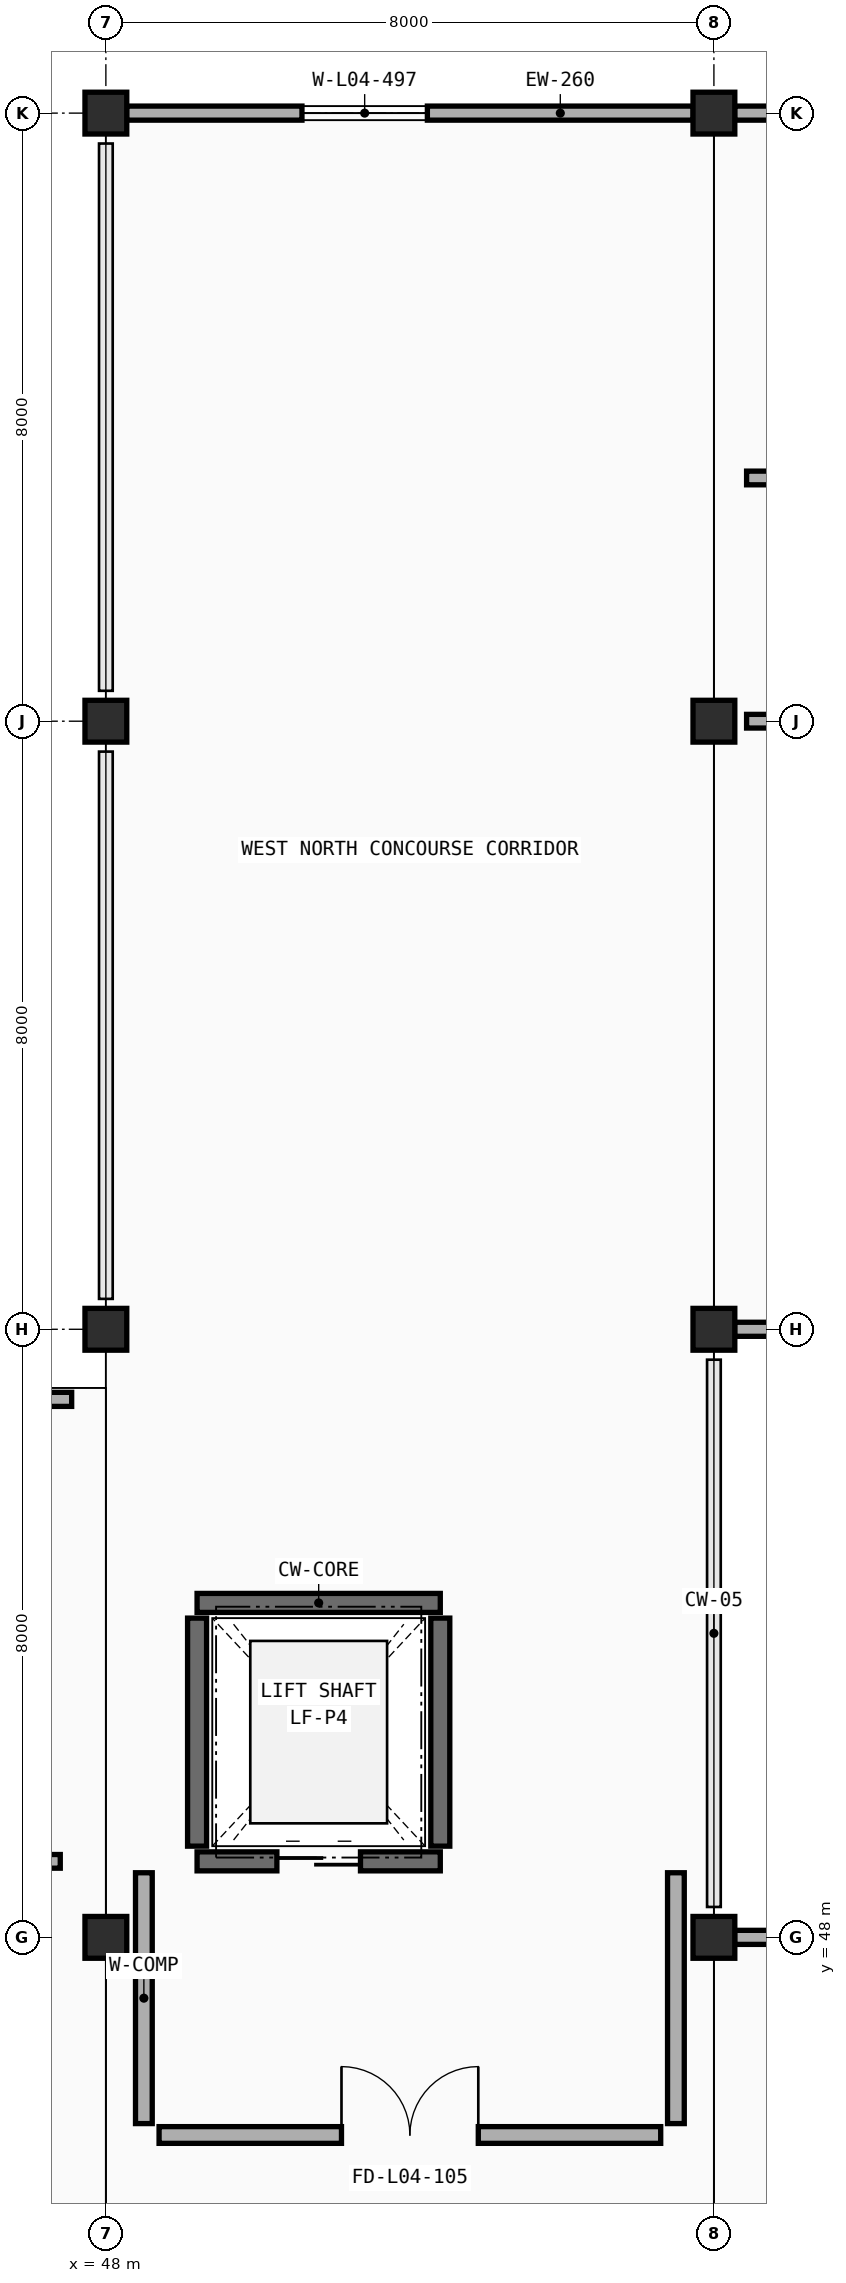
"""IFC4 building model, lengths in metres.
Left out: names, types, materials, properties, quantities, classifications, styles, units other than length and angle.
Written with IfcOpenShell. Run it as: python <this file> out.ifc"""

import sys

from ifc_helpers import new_model, si_unit, direction, frame, frame_2d, origin, origin_2d, place, context, subcontext, project, spatial, rectangle, extrude, element, fill, save


model = new_model("IFC4")
c1 = context("Model", 3, precision=1e-05, world=origin(), true_north=direction((0.0, 1.0)))
c2 = subcontext(c1, "Body", "Model", "MODEL_VIEW")
j1 = project(units=[si_unit("LENGTHUNIT", "METRE"), si_unit("PLANEANGLEUNIT", "RADIAN")], contexts=[c1])
p1 = place(None, origin())
s1 = spatial("IfcSite", under=j1, at=p1, CompositionType="ELEMENT")
p2 = place(p1, origin())
s2 = spatial("IfcBuilding", under=s1, at=p2, CompositionType="ELEMENT")
p3 = place(p2, frame((0.0, 0.0, 13.8)))
s3 = spatial("IfcBuildingStorey", under=s2, at=p3, CompositionType="ELEMENT", Elevation=13.8)
for number, where, z_axis, x_axis in (
    (1, (48.0, 48.0, 0.0), (0.0, 0.0, 1.0), (1.0, 0.0, 0.0)),
    (2, (56.0, 48.0, 0.0), (0.0, 0.0, 1.0), (1.0, 0.0, 0.0)),
    (3, (48.0, 56.0, 0.0), (0.0, 0.0, 1.0), (1.0, 0.0, 0.0)),
    (4, (56.0, 56.0, 0.0), (0.0, 0.0, 1.0), (1.0, 0.0, 0.0)),
    (5, (48.0, 64.0, 0.0), (0.0, 0.0, 1.0), (1.0, 0.0, 0.0)),
    (6, (56.0, 64.0, 0.0), (0.0, 0.0, 1.0), (1.0, 0.0, 0.0)),
    (7, (48.0, 72.0, 0.0), (0.0, 0.0, 1.0), (1.0, 0.0, 0.0)),
    (8, (56.0, 72.0, 0.0), (0.0, 0.0, 1.0), (1.0, 0.0, 0.0)),
):
    element("IfcColumn", number, at=place(p3, frame(where, z_axis=z_axis, x_axis=x_axis)), inside=s3, PredefinedType="COLUMN", context=c2, shape_type="SweptSolid", body=[
        extrude(rectangle(XDim=0.55, YDim=0.55, at=origin_2d()), origin(), (0.0, 0.0, 1.0), 4.2),
    ])
p4 = place(p3, frame((56.272, 48.0, 0.0), z_axis=(0.0, 0.0, 1.0), x_axis=(1.0, 0.0, 0.0)))
e9 = element("IfcWall", 9, at=p4, inside=s3, PredefinedType="STANDARD", context=c2, shape_type="SweptSolid", body=[
    extrude(rectangle(XDim=7.431, YDim=0.185, at=frame_2d((3.715, 0.0))), origin(), (0.0, 0.0, 1.0), 3.325),
])
p5 = place(p4, frame((2.308, 0.0, 0.9)))
e10 = element("IfcOpeningElement", 10, at=p5, cuts=e9, PredefinedType="OPENING", context=c2, shape_type="SweptSolid", body=[
    extrude(rectangle(XDim=2.25, YDim=1.55, at=frame_2d((1.125, 0.775))), frame((0.0, 0.103, 0.0), z_axis=(0.0, -1.0, 0.0), x_axis=(1.0, 0.0, 0.0)), (0.0, 0.0, 1.0), 0.205),
])
p6 = place(p3, frame((63.678, 56.0, 0.0), z_axis=(0.0, 0.0, 1.0), x_axis=(-1.0, 0.0, 0.0)))
e11 = element("IfcWall", 11, at=p6, inside=s3, PredefinedType="STANDARD", context=c2, shape_type="SweptSolid", body=[
    extrude(rectangle(XDim=7.406, YDim=0.185, at=frame_2d((3.703, 0.0))), origin(), (0.0, 0.0, 1.0), 3.325),
])
p7 = place(p6, frame((2.258, 0.0, 0.9)))
e12 = element("IfcOpeningElement", 12, at=p7, cuts=e11, PredefinedType="OPENING", context=c2, shape_type="SweptSolid", body=[
    extrude(rectangle(XDim=1.65, YDim=2.0, at=frame_2d((0.825, 1.0))), frame((0.0, 0.103, 0.0), z_axis=(0.0, -1.0, 0.0), x_axis=(1.0, 0.0, 0.0)), (0.0, 0.0, 1.0), 0.205),
])
p8 = place(p3, frame((56.272, 72.0, 0.0), z_axis=(0.0, 0.0, 1.0), x_axis=(1.0, 0.0, 0.0)))
e13 = element("IfcWall", 13, at=p8, inside=s3, PredefinedType="STANDARD", context=c2, shape_type="SweptSolid", body=[
    extrude(rectangle(XDim=7.406, YDim=0.185, at=frame_2d((3.703, 0.0))), origin(), (0.0, 0.0, 1.0), 3.325),
])
p9 = place(p8, frame((2.308, 0.0, 0.9)))
e14 = element("IfcOpeningElement", 14, at=p9, cuts=e13, PredefinedType="OPENING", context=c2, shape_type="SweptSolid", body=[
    extrude(rectangle(XDim=1.85, YDim=2.0, at=frame_2d((0.925, 1.0))), frame((0.0, 0.103, 0.0), z_axis=(0.0, -1.0, 0.0), x_axis=(1.0, 0.0, 0.0)), (0.0, 0.0, 1.0), 0.205),
])
p10 = place(p3, frame((48.272, 72.0, 0.0), z_axis=(0.0, 0.0, 1.0), x_axis=(1.0, 0.0, 0.0)))
e15 = element("IfcWall", 15, at=p10, inside=s3, PredefinedType="STANDARD", context=c2, shape_type="SweptSolid", body=[
    extrude(rectangle(XDim=7.456, YDim=0.185, at=frame_2d((3.728, 0.0))), origin(), (0.0, 0.0, 1.0), 3.325),
])
p11 = place(p10, frame((2.308, 0.0, 0.9)))
e16 = element("IfcOpeningElement", 16, at=p11, cuts=e15, PredefinedType="OPENING", context=c2, shape_type="SweptSolid", body=[
    extrude(rectangle(XDim=1.65, YDim=1.85, at=frame_2d((0.825, 0.925))), frame((0.0, 0.103, 0.0), z_axis=(0.0, -1.0, 0.0), x_axis=(1.0, 0.0, 0.0)), (0.0, 0.0, 1.0), 0.205),
])
p12 = place(p3, frame((42.322, 55.078, 0.0), z_axis=(0.0, 0.0, 1.0), x_axis=(1.0, 0.0, 0.0)))
e17 = element("IfcWall", 17, at=p12, inside=s3, PredefinedType="STANDARD", context=c2, shape_type="SweptSolid", body=[
    extrude(rectangle(XDim=5.228, YDim=0.185, at=frame_2d((2.614, 0.0))), origin(), (0.0, 0.0, 1.0), 3.325),
])
p13 = place(p12, frame((1.928, 0.0, 0.9)))
e18 = element("IfcOpeningElement", 18, at=p13, cuts=e17, PredefinedType="OPENING", context=c2, shape_type="SweptSolid", body=[
    extrude(rectangle(XDim=1.25, YDim=1.25, at=frame_2d((0.625, 0.625))), frame((0.0, 0.103, 0.0), z_axis=(0.0, -1.0, 0.0), x_axis=(1.0, 0.0, 0.0)), (0.0, 0.0, 1.0), 0.205),
])
p14 = place(p3, frame((49.2, 49.0, 0.0), z_axis=(0.0, 0.0, 1.0), x_axis=(1.0, 0.0, 0.0)))
e19 = element("IfcWall", 19, at=p14, inside=s3, PredefinedType="SOLIDWALL", context=c2, shape_type="SweptSolid", body=[
    extrude(rectangle(XDim=3.2, YDim=0.25, at=frame_2d((1.6, 0.0))), origin(), (0.0, 0.0, 1.0), 4.2),
])
p15 = place(p14, frame((1.05, 0.0, 0.0)))
e20 = element("IfcOpeningElement", 20, at=p15, cuts=e19, PredefinedType="OPENING", context=c2, shape_type="SweptSolid", body=[
    extrude(rectangle(XDim=1.1, YDim=2.15, at=frame_2d((0.55, 1.075))), frame((0.0, 0.135, 0.0), z_axis=(0.0, -1.0, 0.0), x_axis=(1.0, 0.0, 0.0)), (0.0, 0.0, 1.0), 0.27),
])
p16 = place(p3, frame((49.2, 52.4, 0.0), z_axis=(0.0, 0.0, 1.0), x_axis=(1.0, 0.0, 0.0)))
e21 = element("IfcWall", 21, at=p16, inside=s3, PredefinedType="SOLIDWALL", context=c2, shape_type="SweptSolid", body=[
    extrude(rectangle(XDim=3.2, YDim=0.25, at=frame_2d((1.6, 0.0))), origin(), (0.0, 0.0, 1.0), 4.2),
])
for number, where, z_axis, x_axis in (
    (22, (49.2, 49.2, 0.0), (0.0, 0.0, 1.0), (0.0, 1.0, 0.0)),
    (23, (52.4, 49.2, 0.0), (0.0, 0.0, 1.0), (0.0, 1.0, 0.0)),
):
    element("IfcWall", number, at=place(p3, frame(where, z_axis=z_axis, x_axis=x_axis)), inside=s3, PredefinedType="SOLIDWALL", context=c2, shape_type="SweptSolid", body=[
        extrude(rectangle(XDim=3.0, YDim=0.25, at=frame_2d((1.5, 0.0))), origin(), (0.0, 0.0, 1.0), 4.2),
    ])
p17 = place(p3, frame((48.7, 45.4, 0.0), z_axis=(0.0, 0.0, 1.0), x_axis=(1.0, 0.0, 0.0)))
e24 = element("IfcWall", 24, at=p17, inside=s3, PredefinedType="PARTITIONING", context=c2, shape_type="SweptSolid", body=[
    extrude(rectangle(XDim=6.6, YDim=0.22, at=frame_2d((3.3, 0.0))), origin(), (0.0, 0.0, 1.0), 3.3),
])
p18 = place(p17, frame((2.4, 0.0, 0.0)))
e25 = element("IfcOpeningElement", 25, at=p18, cuts=e24, PredefinedType="OPENING", context=c2, shape_type="SweptSolid", body=[
    extrude(rectangle(XDim=1.8, YDim=2.2, at=frame_2d((0.9, 1.1))), frame((0.0, 0.12, 0.0), z_axis=(0.0, -1.0, 0.0), x_axis=(1.0, 0.0, 0.0)), (0.0, 0.0, 1.0), 0.24),
])
for number, where, z_axis, x_axis in (
    (26, (48.5, 45.55, 0.0), (0.0, 0.0, 1.0), (0.0, 1.0, 0.0)),
    (27, (55.5, 45.55, 0.0), (0.0, 0.0, 1.0), (0.0, 1.0, 0.0)),
):
    element("IfcWall", number, at=place(p3, frame(where, z_axis=z_axis, x_axis=x_axis)), inside=s3, PredefinedType="PARTITIONING", context=c2, shape_type="SweptSolid", body=[
        extrude(rectangle(XDim=3.3, YDim=0.22, at=frame_2d((1.65, 0.0))), origin(), (0.0, 0.0, 1.0), 3.225),
    ])
p19 = place(p3, frame((56.43, 64.0, 0.0), z_axis=(0.0, 0.0, 1.0), x_axis=(1.0, 0.0, 0.0)))
e28 = element("IfcWall", 28, at=p19, inside=s3, PredefinedType="PARTITIONING", context=c2, shape_type="SweptSolid", body=[
    extrude(rectangle(XDim=23.14, YDim=0.18, at=frame_2d((11.57, 0.0))), origin(), (0.0, 0.0, 1.0), 3.275),
])
p20 = place(p19, frame((2.85, 0.0, 0.0)))
e29 = element("IfcOpeningElement", 29, at=p20, cuts=e28, PredefinedType="OPENING", context=c2, shape_type="SweptSolid", body=[
    extrude(rectangle(XDim=1.44, YDim=2.2, at=frame_2d((0.72, 1.1))), frame((0.0, 0.1, 0.0), z_axis=(0.0, -1.0, 0.0), x_axis=(1.0, 0.0, 0.0)), (0.0, 0.0, 1.0), 0.2),
])
p21 = place(p3, frame((56.43, 67.2, 0.0), z_axis=(0.0, 0.0, 1.0), x_axis=(1.0, 0.0, 0.0)))
e30 = element("IfcWall", 30, at=p21, inside=s3, PredefinedType="PARTITIONING", context=c2, shape_type="SweptSolid", body=[
    extrude(rectangle(XDim=23.14, YDim=0.18, at=frame_2d((11.57, 0.0))), origin(), (0.0, 0.0, 1.0), 3.3),
])
p22 = place(p21, frame((3.045, 0.0, 0.0)))
e31 = element("IfcOpeningElement", 31, at=p22, cuts=e30, PredefinedType="OPENING", context=c2, shape_type="SweptSolid", body=[
    extrude(rectangle(XDim=1.05, YDim=2.15, at=frame_2d((0.525, 1.075))), frame((0.0, 0.1, 0.0), z_axis=(0.0, -1.0, 0.0), x_axis=(1.0, 0.0, 0.0)), (0.0, 0.0, 1.0), 0.2),
])
p23 = place(p3, frame((42.6, 49.0, 0.0), z_axis=(0.0, 0.0, 1.0), x_axis=(1.0, 0.0, 0.0)))
e32 = element("IfcWall", 32, at=p23, inside=s3, PredefinedType="PARTITIONING", context=c2, shape_type="SweptSolid", body=[
    extrude(rectangle(XDim=4.8, YDim=0.18, at=frame_2d((2.4, 0.0))), origin(), (0.0, 0.0, 1.0), 3.275),
])
p24 = place(p11, origin())
e33 = element("IfcWindow", 33, at=p24, inside=s3, PartitioningType="DOUBLE_PANEL_VERTICAL", PredefinedType="WINDOW", context=c2, shape_type="SweptSolid", body=[
    extrude(rectangle(XDim=1.65, YDim=1.85, at=frame_2d((0.825, 0.925))), frame((0.0, 0.03, 0.0), z_axis=(0.0, -1.0, 0.0), x_axis=(1.0, 0.0, 0.0)), (0.0, 0.0, 1.0), 0.06),
])
fill(e16, e33)
p25 = place(p15, origin())
e34 = element("IfcDoor", 34, at=p25, inside=s3, OperationType="DOUBLE_DOOR_SLIDING", PredefinedType="DOOR", context=c2, shape_type="SweptSolid", body=[
    extrude(rectangle(XDim=1.1, YDim=2.15, at=frame_2d((0.55, 1.075))), frame((0.0, 0.025, 0.0), z_axis=(0.0, -1.0, 0.0), x_axis=(1.0, 0.0, 0.0)), (0.0, 0.0, 1.0), 0.05),
])
fill(e20, e34)
p26 = place(p18, origin())
e35 = element("IfcDoor", 35, at=p26, inside=s3, OperationType="DOUBLE_DOOR_SINGLE_SWING", PredefinedType="DOOR", context=c2, shape_type="SweptSolid", body=[
    extrude(rectangle(XDim=1.8, YDim=2.2, at=frame_2d((0.9, 1.1))), frame((0.0, 0.025, 0.0), z_axis=(0.0, -1.0, 0.0), x_axis=(1.0, 0.0, 0.0)), (0.0, 0.0, 1.0), 0.05),
])
fill(e25, e35)
save(model, sys.argv[1])
